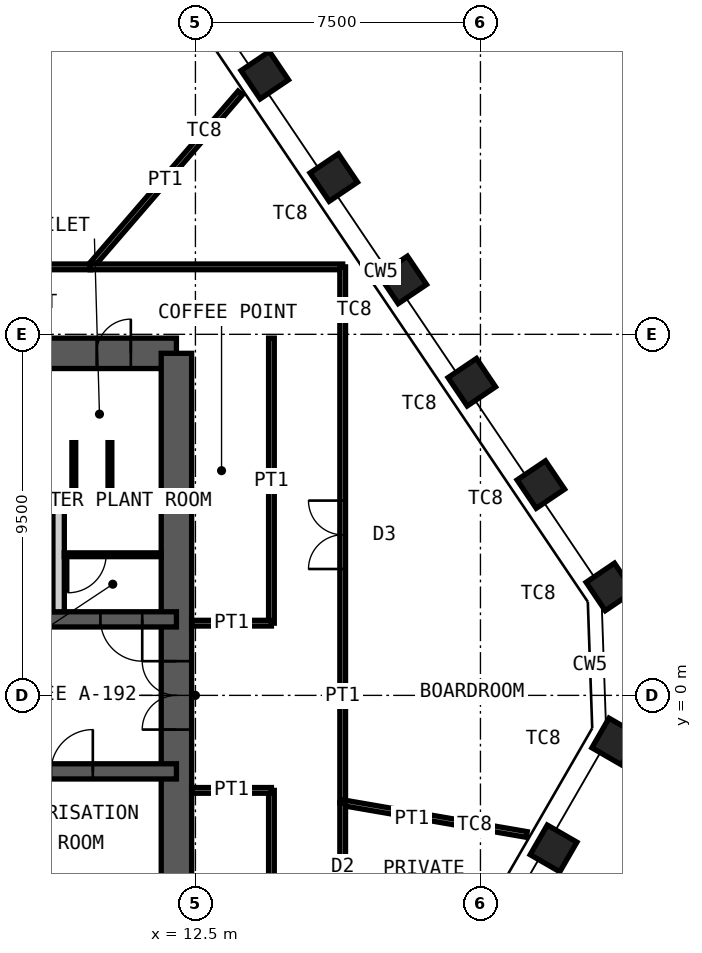
"""IFC4 building model, lengths in metres.
Left out: names, types, materials, properties, quantities, classifications, styles, units other than length and angle.
Written with IfcOpenShell. Run it as: python <this file> out.ifc"""

import sys

from ifc_helpers import new_model, si_unit, direction, frame, frame_2d, origin, origin_2d, place, context, subcontext, project, spatial, rectangle, hollow_rectangle, extrude, element, fill, save


model = new_model("IFC4")
c1 = context("Model", 3, precision=1e-05, world=origin(), true_north=direction((0.0, 1.0)))
c2 = subcontext(c1, "Body", "Model", "MODEL_VIEW")
j1 = project(units=[si_unit("LENGTHUNIT", "METRE"), si_unit("PLANEANGLEUNIT", "RADIAN")], contexts=[c1])
p1 = place(None, origin())
s1 = spatial("IfcSite", under=j1, at=p1, CompositionType="ELEMENT")
p2 = place(p1, origin())
s2 = spatial("IfcBuilding", under=s1, at=p2, CompositionType="ELEMENT")
p3 = place(p2, frame((0.0, 0.0, 308.2)))
s3 = spatial("IfcBuildingStorey", under=s2, at=p3, CompositionType="ELEMENT", Elevation=308.2)
for number, where, z_axis, x_axis in (
    (1, (14.324, 16.318, 0.0), (0.0, 0.0, 1.0), (-0.559, 0.829, 0.0)),
    (2, (16.141, 13.625, 0.0), (0.0, 0.0, 1.0), (-0.559, 0.829, 0.0)),
    (3, (17.957, 10.932, 0.0), (0.0, 0.0, 1.0), (-0.559, 0.829, 0.0)),
    (4, (19.773, 8.239, 0.0), (0.0, 0.0, 1.0), (-0.559, 0.829, 0.0)),
    (5, (21.589, 5.547, 0.0), (0.0, 0.0, 1.0), (-0.559, 0.829, 0.0)),
    (6, (23.406, 2.854, 0.0), (0.0, 0.0, 1.0), (-0.559, 0.829, 0.0)),
    (7, (23.548, -1.214, 0.0), (0.0, 0.0, 1.0), (0.5, 0.866, 0.0)),
    (8, (21.924, -4.027, 0.0), (0.0, 0.0, 1.0), (0.5, 0.866, 0.0)),
):
    element("IfcColumn", number, at=place(p3, frame(where, z_axis=z_axis, x_axis=x_axis)), inside=s3, PredefinedType="COLUMN", context=c2, shape_type="SweptSolid", body=[
        extrude(hollow_rectangle(XDim=0.9, YDim=0.9, WallThickness=0.05, at=origin_2d()), origin(), (0.0, 0.0, 1.0), 4.2),
    ])
p4 = place(p3, frame((-12.0, 9.0, 0.0), z_axis=(0.0, 0.0, 1.0), x_axis=(1.0, 0.0, 0.0)))
e9 = element("IfcWall", 9, at=p4, inside=s3, PredefinedType="SHEAR", context=c2, shape_type="SweptSolid", body=[
    extrude(rectangle(XDim=24.0, YDim=0.8, at=frame_2d((12.0, 0.0))), origin(), (0.0, 0.0, 1.0), 4.2),
])
p5 = place(p4, frame((10.4, 0.0, 0.0)))
e10 = element("IfcOpeningElement", 10, at=p5, cuts=e9, PredefinedType="OPENING", context=c2, shape_type="SweptSolid", body=[
    extrude(rectangle(XDim=1.0, YDim=2.1, at=frame_2d((0.5, 1.05))), frame((0.0, 0.41, 0.0), z_axis=(0.0, -1.0, 0.0), x_axis=(1.0, 0.0, 0.0)), (0.0, 0.0, 1.0), 0.82),
])
p6 = place(p4, frame((17.6, 0.0, 0.0)))
e11 = element("IfcOpeningElement", 11, at=p6, cuts=e9, PredefinedType="OPENING", context=c2, shape_type="SweptSolid", body=[
    extrude(rectangle(XDim=0.9, YDim=2.1, at=frame_2d((0.45, 1.05))), frame((0.0, 0.41, 0.0), z_axis=(0.0, -1.0, 0.0), x_axis=(1.0, 0.0, 0.0)), (0.0, 0.0, 1.0), 0.82),
])
p7 = place(p4, frame((21.9, 0.0, 0.0)))
e12 = element("IfcOpeningElement", 12, at=p7, cuts=e9, PredefinedType="OPENING", context=c2, shape_type="SweptSolid", body=[
    extrude(rectangle(XDim=0.9, YDim=2.1, at=frame_2d((0.45, 1.05))), frame((0.0, 0.41, 0.0), z_axis=(0.0, -1.0, 0.0), x_axis=(1.0, 0.0, 0.0)), (0.0, 0.0, 1.0), 0.82),
])
p8 = place(p3, frame((12.0, -9.0, 0.0), z_axis=(0.0, 0.0, 1.0), x_axis=(0.0, 1.0, 0.0)))
e13 = element("IfcWall", 13, at=p8, inside=s3, PredefinedType="SHEAR", context=c2, shape_type="SweptSolid", body=[
    extrude(rectangle(XDim=18.0, YDim=0.8, at=frame_2d((9.0, 0.0))), origin(), (0.0, 0.0, 1.0), 4.2),
])
p9 = place(p8, frame((8.1, 0.0, 0.0)))
e14 = element("IfcOpeningElement", 14, at=p9, cuts=e13, PredefinedType="OPENING", context=c2, shape_type="SweptSolid", body=[
    extrude(rectangle(XDim=1.8, YDim=2.1, at=frame_2d((0.9, 1.05))), frame((0.0, 0.41, 0.0), z_axis=(0.0, -1.0, 0.0), x_axis=(1.0, 0.0, 0.0)), (0.0, 0.0, 1.0), 0.82),
])
p10 = place(p3, frame((-12.0, 5.0, 0.0), z_axis=(0.0, 0.0, 1.0), x_axis=(1.0, 0.0, 0.0)))
e15 = element("IfcWall", 15, at=p10, inside=s3, PredefinedType="SHEAR", context=c2, shape_type="SweptSolid", body=[
    extrude(rectangle(XDim=24.0, YDim=0.3, at=frame_2d((12.0, 0.0))), origin(), (0.0, 0.0, 1.0), 4.2),
])
p11 = place(p3, frame((-12.0, 2.0, 0.0), z_axis=(0.0, 0.0, 1.0), x_axis=(1.0, 0.0, 0.0)))
e16 = element("IfcWall", 16, at=p11, inside=s3, PredefinedType="SHEAR", context=c2, shape_type="SweptSolid", body=[
    extrude(rectangle(XDim=24.0, YDim=0.4, at=frame_2d((12.0, 0.0))), origin(), (0.0, 0.0, 1.0), 4.2),
])
p12 = place(p11, frame((2.4, 0.0, 0.0)))
e17 = element("IfcOpeningElement", 17, at=p12, cuts=e16, PredefinedType="OPENING", context=c2, shape_type="SweptSolid", body=[
    extrude(rectangle(XDim=1.1, YDim=2.1, at=frame_2d((0.55, 1.05))), frame((0.0, 0.21, 0.0), z_axis=(0.0, -1.0, 0.0), x_axis=(1.0, 0.0, 0.0)), (0.0, 0.0, 1.0), 0.42),
])
p13 = place(p11, frame((22.0, 0.0, 0.0)))
e18 = element("IfcOpeningElement", 18, at=p13, cuts=e16, PredefinedType="OPENING", context=c2, shape_type="SweptSolid", body=[
    extrude(rectangle(XDim=1.1, YDim=2.1, at=frame_2d((0.55, 1.05))), frame((0.0, 0.21, 0.0), z_axis=(0.0, -1.0, 0.0), x_axis=(1.0, 0.0, 0.0)), (0.0, 0.0, 1.0), 0.42),
])
p14 = place(p11, frame((10.15, 0.0, 0.0)))
e19 = element("IfcOpeningElement", 19, at=p14, cuts=e16, PredefinedType="OPENING", context=c2, shape_type="SweptSolid", body=[
    extrude(rectangle(XDim=1.0, YDim=2.1, at=frame_2d((0.5, 1.05))), frame((0.0, 0.21, 0.0), z_axis=(0.0, -1.0, 0.0), x_axis=(1.0, 0.0, 0.0)), (0.0, 0.0, 1.0), 0.42),
])
p15 = place(p11, frame((6.9, 0.0, 0.0)))
e20 = element("IfcOpeningElement", 20, at=p15, cuts=e16, PredefinedType="OPENING", context=c2, shape_type="SweptSolid", body=[
    extrude(rectangle(XDim=1.0, YDim=2.1, at=frame_2d((0.5, 1.05))), frame((0.0, 0.21, 0.0), z_axis=(0.0, -1.0, 0.0), x_axis=(1.0, 0.0, 0.0)), (0.0, 0.0, 1.0), 0.42),
])
p16 = place(p11, frame((13.35, 0.0, 0.0)))
e21 = element("IfcOpeningElement", 21, at=p16, cuts=e16, PredefinedType="OPENING", context=c2, shape_type="SweptSolid", body=[
    extrude(rectangle(XDim=1.1, YDim=2.4, at=frame_2d((0.55, 1.2))), frame((0.0, 0.21, 0.0), z_axis=(0.0, -1.0, 0.0), x_axis=(1.0, 0.0, 0.0)), (0.0, 0.0, 1.0), 0.42),
])
p17 = place(p11, frame((16.15, 0.0, 0.0)))
e22 = element("IfcOpeningElement", 22, at=p17, cuts=e16, PredefinedType="OPENING", context=c2, shape_type="SweptSolid", body=[
    extrude(rectangle(XDim=1.1, YDim=2.4, at=frame_2d((0.55, 1.2))), frame((0.0, 0.21, 0.0), z_axis=(0.0, -1.0, 0.0), x_axis=(1.0, 0.0, 0.0)), (0.0, 0.0, 1.0), 0.42),
])
p18 = place(p11, frame((19.0, 0.0, 0.0)))
e23 = element("IfcOpeningElement", 23, at=p18, cuts=e16, PredefinedType="OPENING", context=c2, shape_type="SweptSolid", body=[
    extrude(rectangle(XDim=1.0, YDim=2.1, at=frame_2d((0.5, 1.05))), frame((0.0, 0.21, 0.0), z_axis=(0.0, -1.0, 0.0), x_axis=(1.0, 0.0, 0.0)), (0.0, 0.0, 1.0), 0.42),
])
p19 = place(p3, frame((-12.0, -2.0, 0.0), z_axis=(0.0, 0.0, 1.0), x_axis=(1.0, 0.0, 0.0)))
e24 = element("IfcWall", 24, at=p19, inside=s3, PredefinedType="SHEAR", context=c2, shape_type="SweptSolid", body=[
    extrude(rectangle(XDim=24.0, YDim=0.4, at=frame_2d((12.0, 0.0))), origin(), (0.0, 0.0, 1.0), 4.2),
])
p20 = place(p19, frame((1.1, 0.0, 0.0)))
e25 = element("IfcOpeningElement", 25, at=p20, cuts=e24, PredefinedType="OPENING", context=c2, shape_type="SweptSolid", body=[
    extrude(rectangle(XDim=1.1, YDim=2.1, at=frame_2d((0.55, 1.05))), frame((0.0, 0.21, 0.0), z_axis=(0.0, -1.0, 0.0), x_axis=(1.0, 0.0, 0.0)), (0.0, 0.0, 1.0), 0.42),
])
p21 = place(p19, frame((13.55, 0.0, 0.0)))
e26 = element("IfcOpeningElement", 26, at=p21, cuts=e24, PredefinedType="OPENING", context=c2, shape_type="SweptSolid", body=[
    extrude(rectangle(XDim=1.1, YDim=2.1, at=frame_2d((0.55, 1.05))), frame((0.0, 0.21, 0.0), z_axis=(0.0, -1.0, 0.0), x_axis=(1.0, 0.0, 0.0)), (0.0, 0.0, 1.0), 0.42),
])
p22 = place(p19, frame((20.7, 0.0, 0.0)))
e27 = element("IfcOpeningElement", 27, at=p22, cuts=e24, PredefinedType="OPENING", context=c2, shape_type="SweptSolid", body=[
    extrude(rectangle(XDim=1.1, YDim=2.1, at=frame_2d((0.55, 1.05))), frame((0.0, 0.21, 0.0), z_axis=(0.0, -1.0, 0.0), x_axis=(1.0, 0.0, 0.0)), (0.0, 0.0, 1.0), 0.42),
])
p23 = place(p19, frame((4.0, 0.0, 0.0)))
e28 = element("IfcOpeningElement", 28, at=p23, cuts=e24, PredefinedType="OPENING", context=c2, shape_type="SweptSolid", body=[
    extrude(rectangle(XDim=1.0, YDim=2.1, at=frame_2d((0.5, 1.05))), frame((0.0, 0.21, 0.0), z_axis=(0.0, -1.0, 0.0), x_axis=(1.0, 0.0, 0.0)), (0.0, 0.0, 1.0), 0.42),
])
p24 = place(p19, frame((6.8, 0.0, 0.0)))
e29 = element("IfcOpeningElement", 29, at=p24, cuts=e24, PredefinedType="OPENING", context=c2, shape_type="SweptSolid", body=[
    extrude(rectangle(XDim=1.0, YDim=2.1, at=frame_2d((0.5, 1.05))), frame((0.0, 0.21, 0.0), z_axis=(0.0, -1.0, 0.0), x_axis=(1.0, 0.0, 0.0)), (0.0, 0.0, 1.0), 0.42),
])
p25 = place(p19, frame((9.6, 0.0, 0.0)))
e30 = element("IfcOpeningElement", 30, at=p25, cuts=e24, PredefinedType="OPENING", context=c2, shape_type="SweptSolid", body=[
    extrude(rectangle(XDim=1.0, YDim=2.1, at=frame_2d((0.5, 1.05))), frame((0.0, 0.21, 0.0), z_axis=(0.0, -1.0, 0.0), x_axis=(1.0, 0.0, 0.0)), (0.0, 0.0, 1.0), 0.42),
])
p26 = place(p3, frame((8.9, 2.2, 0.0), z_axis=(0.0, 0.0, 1.0), x_axis=(0.0, 1.0, 0.0)))
e31 = element("IfcWall", 31, at=p26, inside=s3, PredefinedType="PARTITIONING", context=c2, shape_type="SweptSolid", body=[
    extrude(rectangle(XDim=2.65, YDim=0.3, at=frame_2d((1.325, 0.0))), origin(), (0.0, 0.0, 1.0), 3.98),
])
p27 = place(p3, frame((9.05, 3.7, 0.0), z_axis=(0.0, 0.0, 1.0), x_axis=(1.0, 0.0, 0.0)))
e32 = element("IfcWall", 32, at=p27, inside=s3, PredefinedType="PARTITIONING", context=c2, shape_type="SweptSolid", body=[
    extrude(rectangle(XDim=2.55, YDim=0.1, at=frame_2d((1.275, 0.0))), origin(), (0.0, 0.0, 1.0), 3.98),
])
p28 = place(p27, frame((0.1, 0.0, 0.0)))
e33 = element("IfcOpeningElement", 33, at=p28, cuts=e32, PredefinedType="OPENING", context=c2, shape_type="SweptSolid", body=[
    extrude(rectangle(XDim=1.0, YDim=2.4, at=frame_2d((0.5, 1.2))), frame((0.0, 0.06, 0.0), z_axis=(0.0, -1.0, 0.0), x_axis=(1.0, 0.0, 0.0)), (0.0, 0.0, 1.0), 0.12),
])
for number, where, z_axis, x_axis in (
    (34, (9.3, 5.15, 0.0), (0.0, 0.0, 1.0), (0.0, 1.0, 0.0)),
    (35, (10.25, 5.15, 0.0), (0.0, 0.0, 1.0), (0.0, 1.0, 0.0)),
):
    element("IfcWall", number, at=place(p3, frame(where, z_axis=z_axis, x_axis=x_axis)), inside=s3, PredefinedType="PARTITIONING", context=c2, shape_type="SweptSolid", body=[
        extrude(rectangle(XDim=1.5, YDim=0.1, at=frame_2d((0.75, 0.0))), origin(), (0.0, 0.0, 1.0), 2.1),
    ])
p29 = place(p3, frame((13.678, 15.85, 0.0), z_axis=(0.0, 0.0, 1.0), x_axis=(-0.65333269737, -0.757070925704, 0.0)))
e36 = element("IfcWall", 36, at=p29, inside=s3, PredefinedType="PARTITIONING", context=c2, shape_type="SweptSolid", body=[
    extrude(rectangle(XDim=6.044, YDim=0.15, at=frame_2d((3.022, 0.0))), origin(), (0.0, 0.0, 1.0), 3.33),
])
p30 = place(p3, frame((9.73, 11.275, 0.0), z_axis=(0.0, 0.0, 1.0), x_axis=(1.0, 0.0, 0.0)))
e37 = element("IfcWall", 37, at=p30, inside=s3, PredefinedType="PARTITIONING", context=c2, shape_type="SweptSolid", body=[
    extrude(rectangle(XDim=6.645, YDim=0.15, at=frame_2d((3.323, 0.0))), origin(), (0.0, 0.0, 1.0), 4.03),
])
p31 = place(p3, frame((16.375, 11.275, 0.0), z_axis=(0.0, 0.0, 1.0), x_axis=(0.0, -1.0, 0.0)))
e38 = element("IfcWall", 38, at=p31, inside=s3, PredefinedType="PARTITIONING", context=c2, shape_type="SweptSolid", body=[
    extrude(rectangle(XDim=14.1, YDim=0.15, at=frame_2d((7.05, 0.0))), origin(), (0.0, 0.0, 1.0), 4.03),
])
p32 = place(p31, frame((6.15, 0.0, 0.0)))
e39 = element("IfcOpeningElement", 39, at=p32, cuts=e38, PredefinedType="OPENING", context=c2, shape_type="SweptSolid", body=[
    extrude(rectangle(XDim=1.8, YDim=2.4, at=frame_2d((0.9, 1.2))), frame((0.0, 0.085, 0.0), z_axis=(0.0, -1.0, 0.0), x_axis=(1.0, 0.0, 0.0)), (0.0, 0.0, 1.0), 0.17),
])
p33 = place(p3, frame((21.219, -3.66, 0.0), z_axis=(0.0, 0.0, 1.0), x_axis=(-0.98545065103, 0.169961802723, 0.0)))
e40 = element("IfcWall", 40, at=p33, inside=s3, PredefinedType="PARTITIONING", context=c2, shape_type="SweptSolid", body=[
    extrude(rectangle(XDim=4.916, YDim=0.15, at=frame_2d((2.458, 0.0))), origin(), (0.0, 0.0, 1.0), 4.03),
])
p34 = place(p3, frame((16.375, -2.825, 0.0), z_axis=(0.0, 0.0, 1.0), x_axis=(0.0, -1.0, 0.0)))
e41 = element("IfcWall", 41, at=p34, inside=s3, PredefinedType="PARTITIONING", context=c2, shape_type="SweptSolid", body=[
    extrude(rectangle(XDim=5.606, YDim=0.15, at=frame_2d((2.803, 0.0))), origin(), (0.0, 0.0, 1.0), 4.03),
])
p35 = place(p34, frame((2.303, 0.0, 0.0)))
e42 = element("IfcOpeningElement", 42, at=p35, cuts=e41, PredefinedType="OPENING", context=c2, shape_type="SweptSolid", body=[
    extrude(rectangle(XDim=1.0, YDim=2.4, at=frame_2d((0.5, 1.2))), frame((0.0, 0.085, 0.0), z_axis=(0.0, -1.0, 0.0), x_axis=(1.0, 0.0, 0.0)), (0.0, 0.0, 1.0), 0.17),
])
p36 = place(p3, frame((-0.543, 11.275, 0.0), z_axis=(0.0, 0.0, 1.0), x_axis=(1.0, 0.0, 0.0)))
e43 = element("IfcWall", 43, at=p36, inside=s3, PredefinedType="PARTITIONING", context=c2, shape_type="SweptSolid", body=[
    extrude(rectangle(XDim=10.273, YDim=0.15, at=frame_2d((5.137, 0.0))), origin(), (0.0, 0.0, 1.0), 4.03),
])
p37 = place(p36, frame((4.237, 0.0, 0.0)))
e44 = element("IfcOpeningElement", 44, at=p37, cuts=e43, PredefinedType="OPENING", context=c2, shape_type="SweptSolid", body=[
    extrude(rectangle(XDim=1.8, YDim=2.4, at=frame_2d((0.9, 1.2))), frame((0.0, 0.085, 0.0), z_axis=(0.0, -1.0, 0.0), x_axis=(1.0, 0.0, 0.0)), (0.0, 0.0, 1.0), 0.17),
])
p38 = place(p3, frame((14.5, 1.9, 0.0), z_axis=(0.0, 0.0, 1.0), x_axis=(0.0, 1.0, 0.0)))
e45 = element("IfcWall", 45, at=p38, inside=s3, PredefinedType="PARTITIONING", context=c2, shape_type="SweptSolid", body=[
    extrude(rectangle(XDim=7.5, YDim=0.15, at=frame_2d((3.75, 0.0))), origin(), (0.0, 0.0, 1.0), 4.03),
])
p39 = place(p3, frame((12.4, 1.9, 0.0), z_axis=(0.0, 0.0, 1.0), x_axis=(1.0, 0.0, 0.0)))
e46 = element("IfcWall", 46, at=p39, inside=s3, PredefinedType="PARTITIONING", context=c2, shape_type="SweptSolid", body=[
    extrude(rectangle(XDim=2.1, YDim=0.15, at=frame_2d((1.05, 0.0))), origin(), (0.0, 0.0, 1.0), 2.93),
])
p40 = place(p3, frame((14.5, -9.4, 0.0), z_axis=(0.0, 0.0, 1.0), x_axis=(0.0, 1.0, 0.0)))
e47 = element("IfcWall", 47, at=p40, inside=s3, PredefinedType="PARTITIONING", context=c2, shape_type="SweptSolid", body=[
    extrude(rectangle(XDim=6.9, YDim=0.15, at=frame_2d((3.45, 0.0))), origin(), (0.0, 0.0, 1.0), 4.03),
])
p41 = place(p3, frame((12.4, -2.5, 0.0), z_axis=(0.0, 0.0, 1.0), x_axis=(1.0, 0.0, 0.0)))
e48 = element("IfcWall", 48, at=p41, inside=s3, PredefinedType="PARTITIONING", context=c2, shape_type="SweptSolid", body=[
    extrude(rectangle(XDim=2.1, YDim=0.15, at=frame_2d((1.05, 0.0))), origin(), (0.0, 0.0, 1.0), 3.33),
])
p42 = place(p7, origin())
e49 = element("IfcDoor", 49, at=p42, inside=s3, OperationType="SINGLE_SWING_LEFT", PredefinedType="DOOR", context=c2, shape_type="SweptSolid", body=[
    extrude(rectangle(XDim=0.9, YDim=2.1, at=frame_2d((0.45, 1.05))), frame((0.0, 0.025, 0.0), z_axis=(0.0, -1.0, 0.0), x_axis=(1.0, 0.0, 0.0)), (0.0, 0.0, 1.0), 0.05),
])
fill(e12, e49)
p43 = place(p13, origin())
e50 = element("IfcDoor", 50, at=p43, inside=s3, OperationType="SINGLE_SWING_RIGHT", PredefinedType="DOOR", context=c2, shape_type="SweptSolid", body=[
    extrude(rectangle(XDim=1.1, YDim=2.1, at=frame_2d((0.55, 1.05))), frame((0.0, 0.025, 0.0), z_axis=(0.0, -1.0, 0.0), x_axis=(1.0, 0.0, 0.0)), (0.0, 0.0, 1.0), 0.05),
])
fill(e18, e50)
p44 = place(p22, origin())
e51 = element("IfcDoor", 51, at=p44, inside=s3, OperationType="SINGLE_SWING_LEFT", PredefinedType="DOOR", context=c2, shape_type="SweptSolid", body=[
    extrude(rectangle(XDim=1.1, YDim=2.1, at=frame_2d((0.55, 1.05))), frame((0.0, 0.025, 0.0), z_axis=(0.0, -1.0, 0.0), x_axis=(1.0, 0.0, 0.0)), (0.0, 0.0, 1.0), 0.05),
])
fill(e27, e51)
p45 = place(p9, origin())
e52 = element("IfcDoor", 52, at=p45, inside=s3, OperationType="DOUBLE_DOOR_DOUBLE_SWING", PredefinedType="DOOR", context=c2, shape_type="SweptSolid", body=[
    extrude(rectangle(XDim=1.8, YDim=2.1, at=frame_2d((0.9, 1.05))), frame((0.0, 0.025, 0.0), z_axis=(0.0, -1.0, 0.0), x_axis=(1.0, 0.0, 0.0)), (0.0, 0.0, 1.0), 0.05),
])
fill(e14, e52)
p46 = place(p28, origin())
e53 = element("IfcDoor", 53, at=p46, inside=s3, OperationType="SINGLE_SWING_LEFT", PredefinedType="DOOR", context=c2, shape_type="SweptSolid", body=[
    extrude(rectangle(XDim=1.0, YDim=2.4, at=frame_2d((0.5, 1.2))), frame((0.0, 0.025, 0.0), z_axis=(0.0, -1.0, 0.0), x_axis=(1.0, 0.0, 0.0)), (0.0, 0.0, 1.0), 0.05),
])
fill(e33, e53)
p47 = place(p32, origin())
e54 = element("IfcDoor", 54, at=p47, inside=s3, OperationType="DOUBLE_DOOR_DOUBLE_SWING", PredefinedType="DOOR", context=c2, shape_type="SweptSolid", body=[
    extrude(rectangle(XDim=1.8, YDim=2.4, at=frame_2d((0.9, 1.2))), frame((0.0, 0.025, 0.0), z_axis=(0.0, -1.0, 0.0), x_axis=(1.0, 0.0, 0.0)), (0.0, 0.0, 1.0), 0.05),
])
fill(e39, e54)
save(model, sys.argv[1])
